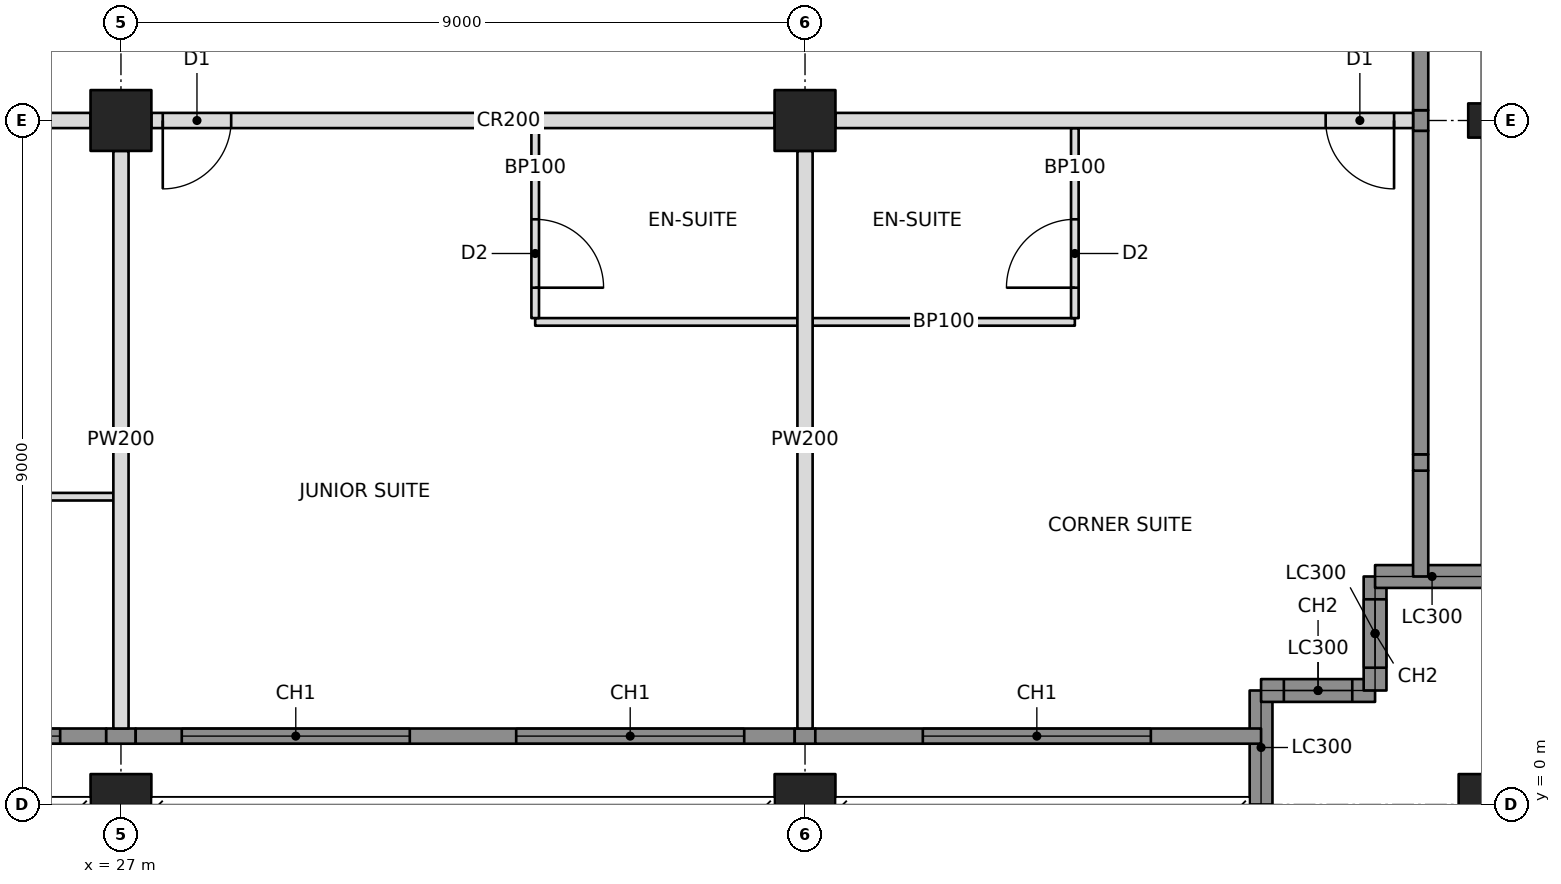
"""IFC4 building model, lengths in metres.
Left out: names, types, materials, properties, quantities, classifications, styles, units other than length and angle.
Written with IfcOpenShell. Run it as: python <this file> out.ifc"""

import sys

from ifc_helpers import new_model, si_unit, direction, frame, frame_2d, origin, origin_2d, place, context, subcontext, project, spatial, rectangle, hollow_rectangle, i_section, extrude, element, fill, save


model = new_model("IFC4")
c1 = context("Model", 3, precision=1e-05, world=origin(), true_north=direction((0.0, 1.0)))
c2 = subcontext(c1, "Body", "Model", "MODEL_VIEW")
j1 = project(units=[si_unit("LENGTHUNIT", "METRE"), si_unit("PLANEANGLEUNIT", "RADIAN")], contexts=[c1])
p1 = place(None, origin())
s1 = spatial("IfcSite", under=j1, at=p1, CompositionType="ELEMENT")
p2 = place(p1, origin())
s2 = spatial("IfcBuilding", under=s1, at=p2, CompositionType="ELEMENT")
p3 = place(p2, frame((0.0, 0.0, 177.4)))
s3 = spatial("IfcBuildingStorey", under=s2, at=p3, CompositionType="ELEMENT", Elevation=177.4)
p4 = place(p3, frame((27.0, 0.0, 0.0), z_axis=(0.0, 0.0, 1.0), x_axis=(1.0, 0.0, 0.0)))
e1 = element("IfcColumn", 1, at=p4, inside=s3, PredefinedType="COLUMN", context=c2, shape_type="SweptSolid", body=[
    extrude(hollow_rectangle(XDim=0.8, YDim=0.8, WallThickness=0.07, at=origin_2d()), origin(), (0.0, 0.0, 1.0), 3.4),
])
p5 = place(p3, frame((27.0, 9.0, 0.0), z_axis=(0.0, 0.0, 1.0), x_axis=(1.0, 0.0, 0.0)))
e2 = element("IfcColumn", 2, at=p5, inside=s3, PredefinedType="COLUMN", context=c2, shape_type="SweptSolid", body=[
    extrude(hollow_rectangle(XDim=0.8, YDim=0.8, WallThickness=0.06, at=origin_2d()), origin(), (0.0, 0.0, 1.0), 3.4),
])
p6 = place(p3, frame((36.0, 0.0, 0.0), z_axis=(0.0, 0.0, 1.0), x_axis=(1.0, 0.0, 0.0)))
e3 = element("IfcColumn", 3, at=p6, inside=s3, PredefinedType="COLUMN", context=c2, shape_type="SweptSolid", body=[
    extrude(hollow_rectangle(XDim=0.8, YDim=0.8, WallThickness=0.07, at=origin_2d()), origin(), (0.0, 0.0, 1.0), 3.4),
])
p7 = place(p3, frame((36.0, 9.0, 0.0), z_axis=(0.0, 0.0, 1.0), x_axis=(0.0, 1.0, 0.0)))
e4 = element("IfcColumn", 4, at=p7, inside=s3, PredefinedType="COLUMN", context=c2, shape_type="SweptSolid", body=[
    extrude(hollow_rectangle(XDim=0.8, YDim=0.8, WallThickness=0.06, at=origin_2d()), origin(), (0.0, 0.0, 1.0), 3.4),
])
p8 = place(p3, frame((45.0, 0.0, 0.0), z_axis=(0.0, 0.0, 1.0), x_axis=(1.0, 0.0, 0.0)))
e5 = element("IfcColumn", 5, at=p8, inside=s3, PredefinedType="COLUMN", context=c2, shape_type="SweptSolid", body=[
    extrude(hollow_rectangle(XDim=0.8, YDim=0.8, WallThickness=0.07, at=origin_2d()), origin(), (0.0, 0.0, 1.0), 3.4),
])
p9 = place(p3, frame((45.0, 9.0, 0.0), z_axis=(0.0, 0.0, 1.0), x_axis=(0.0, 1.0, 0.0)))
e6 = element("IfcColumn", 6, at=p9, inside=s3, PredefinedType="COLUMN", context=c2, shape_type="SweptSolid", body=[
    extrude(i_section(OverallWidth=0.449, OverallDepth=0.549, WebThickness=0.072, FlangeThickness=0.115, at=origin_2d()), origin(), (0.0, 0.0, 1.0), 3.4),
])
p10 = place(p3, frame((42.0, 0.0, 0.0), z_axis=(0.0, 0.0, 1.0), x_axis=(0.0, 1.0, 0.0)))
e7 = element("IfcWall", 7, at=p10, inside=s3, PredefinedType="SOLIDWALL", context=c2, shape_type="SweptSolid", body=[
    extrude(rectangle(XDim=1.5, YDim=0.3, at=frame_2d((0.75, 0.0))), origin(), (0.0, 0.0, 1.0), 2.42),
])
p11 = place(p3, frame((42.0, 1.5, 0.0), z_axis=(0.0, 0.0, 1.0), x_axis=(1.0, 0.0, 0.0)))
e8 = element("IfcWall", 8, at=p11, inside=s3, PredefinedType="SOLIDWALL", context=c2, shape_type="SweptSolid", body=[
    extrude(rectangle(XDim=1.5, YDim=0.3, at=frame_2d((0.75, 0.0))), origin(), (0.0, 0.0, 1.0), 3.2),
])
p12 = place(p11, frame((0.3, 0.0, 0.6)))
e9 = element("IfcOpeningElement", 9, at=p12, cuts=e8, PredefinedType="OPENING", context=c2, shape_type="SweptSolid", body=[
    extrude(rectangle(XDim=0.9, YDim=2.2, at=frame_2d((0.45, 1.1))), frame((0.0, 0.16, 0.0), z_axis=(0.0, -1.0, 0.0), x_axis=(1.0, 0.0, 0.0)), (0.0, 0.0, 1.0), 0.32),
])
p13 = place(p3, frame((43.5, 1.5, 0.0), z_axis=(0.0, 0.0, 1.0), x_axis=(0.0, 1.0, 0.0)))
e10 = element("IfcWall", 10, at=p13, inside=s3, PredefinedType="SOLIDWALL", context=c2, shape_type="SweptSolid", body=[
    extrude(rectangle(XDim=1.5, YDim=0.3, at=frame_2d((0.75, 0.0))), origin(), (0.0, 0.0, 1.0), 3.2),
])
p14 = place(p13, frame((0.3, 0.0, 0.6)))
e11 = element("IfcOpeningElement", 11, at=p14, cuts=e10, PredefinedType="OPENING", context=c2, shape_type="SweptSolid", body=[
    extrude(rectangle(XDim=0.9, YDim=2.2, at=frame_2d((0.45, 1.1))), frame((0.0, 0.16, 0.0), z_axis=(0.0, -1.0, 0.0), x_axis=(1.0, 0.0, 0.0)), (0.0, 0.0, 1.0), 0.32),
])
p15 = place(p3, frame((43.5, 3.0, 0.0), z_axis=(0.0, 0.0, 1.0), x_axis=(1.0, 0.0, 0.0)))
e12 = element("IfcWall", 12, at=p15, inside=s3, PredefinedType="SOLIDWALL", context=c2, shape_type="SweptSolid", body=[
    extrude(rectangle(XDim=1.5, YDim=0.3, at=frame_2d((0.75, 0.0))), origin(), (0.0, 0.0, 1.0), 2.42),
])
p16 = place(p3, frame((44.1, 3.0, 0.0), z_axis=(0.0, 0.0, 1.0), x_axis=(0.0, 1.0, 0.0)))
e13 = element("IfcWall", 13, at=p16, inside=s3, PredefinedType="SOLIDWALL", context=c2, shape_type="SweptSolid", body=[
    extrude(rectangle(XDim=1.393, YDim=0.2, at=frame_2d((0.696, 0.0))), origin(), (0.0, 0.0, 1.0), 3.2),
])
p17 = place(p3, frame((18.4, 9.0, 0.0), z_axis=(0.0, 0.0, 1.0), x_axis=(1.0, 0.0, 0.0)))
e14 = element("IfcWall", 14, at=p17, inside=s3, PredefinedType="PARTITIONING", context=c2, shape_type="SweptSolid", body=[
    extrude(rectangle(XDim=8.2, YDim=0.2, at=frame_2d((4.1, 0.0))), origin(), (0.0, 0.0, 1.0), 2.405),
])
p18 = place(p17, frame((0.15, 0.0, 0.0)))
e15 = element("IfcOpeningElement", 15, at=p18, cuts=e14, PredefinedType="OPENING", context=c2, shape_type="SweptSolid", body=[
    extrude(rectangle(XDim=0.9, YDim=2.1, at=frame_2d((0.45, 1.05))), frame((0.0, 0.11, 0.0), z_axis=(0.0, -1.0, 0.0), x_axis=(1.0, 0.0, 0.0)), (0.0, 0.0, 1.0), 0.22),
])
p19 = place(p3, frame((27.4, 9.0, 0.0), z_axis=(0.0, 0.0, 1.0), x_axis=(1.0, 0.0, 0.0)))
e16 = element("IfcWall", 16, at=p19, inside=s3, PredefinedType="PARTITIONING", context=c2, shape_type="SweptSolid", body=[
    extrude(rectangle(XDim=8.2, YDim=0.2, at=frame_2d((4.1, 0.0))), origin(), (0.0, 0.0, 1.0), 2.405),
])
p20 = place(p19, frame((0.15, 0.0, 0.0)))
e17 = element("IfcOpeningElement", 17, at=p20, cuts=e16, PredefinedType="OPENING", context=c2, shape_type="SweptSolid", body=[
    extrude(rectangle(XDim=0.9, YDim=2.1, at=frame_2d((0.45, 1.05))), frame((0.0, 0.11, 0.0), z_axis=(0.0, -1.0, 0.0), x_axis=(1.0, 0.0, 0.0)), (0.0, 0.0, 1.0), 0.22),
])
p21 = place(p3, frame((36.4, 9.0, 0.0), z_axis=(0.0, 0.0, 1.0), x_axis=(1.0, 0.0, 0.0)))
e18 = element("IfcWall", 18, at=p21, inside=s3, PredefinedType="PARTITIONING", context=c2, shape_type="SweptSolid", body=[
    extrude(rectangle(XDim=7.6, YDim=0.2, at=frame_2d((3.8, 0.0))), origin(), (0.0, 0.0, 1.0), 2.438),
])
p22 = place(p21, frame((6.45, 0.0, 0.0)))
e19 = element("IfcOpeningElement", 19, at=p22, cuts=e18, PredefinedType="OPENING", context=c2, shape_type="SweptSolid", body=[
    extrude(rectangle(XDim=0.9, YDim=2.1, at=frame_2d((0.45, 1.05))), frame((0.0, 0.11, 0.0), z_axis=(0.0, -1.0, 0.0), x_axis=(1.0, 0.0, 0.0)), (0.0, 0.0, 1.0), 0.22),
])
p23 = place(p3, frame((27.0, 8.6, 0.0), z_axis=(0.0, 0.0, 1.0), x_axis=(0.0, -1.0, 0.0)))
e20 = element("IfcWall", 20, at=p23, inside=s3, PredefinedType="PARTITIONING", context=c2, shape_type="SweptSolid", body=[
    extrude(rectangle(XDim=7.6, YDim=0.2, at=frame_2d((3.8, 0.0))), origin(), (0.0, 0.0, 1.0), 2.405),
])
p24 = place(p3, frame((36.0, 8.6, 0.0), z_axis=(0.0, 0.0, 1.0), x_axis=(0.0, -1.0, 0.0)))
e21 = element("IfcWall", 21, at=p24, inside=s3, PredefinedType="PARTITIONING", context=c2, shape_type="SweptSolid", body=[
    extrude(rectangle(XDim=7.6, YDim=0.2, at=frame_2d((3.8, 0.0))), origin(), (0.0, 0.0, 1.0), 2.438),
])
p25 = place(p3, frame((22.5, 4.05, 0.0), z_axis=(0.0, 0.0, 1.0), x_axis=(1.0, 0.0, 0.0)))
e22 = element("IfcWall", 22, at=p25, inside=s3, PredefinedType="PARTITIONING", context=c2, shape_type="SweptSolid", body=[
    extrude(rectangle(XDim=4.4, YDim=0.1, at=frame_2d((2.2, 0.0))), origin(), (0.0, 0.0, 1.0), 2.404),
])
p26 = place(p25, frame((0.5, 0.0, 0.0)))
e23 = element("IfcOpeningElement", 23, at=p26, cuts=e22, PredefinedType="OPENING", context=c2, shape_type="SweptSolid", body=[
    extrude(rectangle(XDim=0.9, YDim=2.1, at=frame_2d((0.45, 1.05))), frame((0.0, 0.06, 0.0), z_axis=(0.0, -1.0, 0.0), x_axis=(1.0, 0.0, 0.0)), (0.0, 0.0, 1.0), 0.12),
])
p27 = place(p3, frame((32.45, 6.35, 0.0), z_axis=(0.0, 0.0, 1.0), x_axis=(1.0, 0.0, 0.0)))
e24 = element("IfcWall", 24, at=p27, inside=s3, PredefinedType="PARTITIONING", context=c2, shape_type="SweptSolid", body=[
    extrude(rectangle(XDim=3.45, YDim=0.1, at=frame_2d((1.725, 0.0))), origin(), (0.0, 0.0, 1.0), 2.438),
])
p28 = place(p3, frame((32.45, 8.9, 0.0), z_axis=(0.0, 0.0, 1.0), x_axis=(0.0, -1.0, 0.0)))
e25 = element("IfcWall", 25, at=p28, inside=s3, PredefinedType="PARTITIONING", context=c2, shape_type="SweptSolid", body=[
    extrude(rectangle(XDim=2.5, YDim=0.1, at=frame_2d((1.25, 0.0))), origin(), (0.0, 0.0, 1.0), 2.404),
])
p29 = place(p28, frame((1.2, 0.0, 0.0)))
e26 = element("IfcOpeningElement", 26, at=p29, cuts=e25, PredefinedType="OPENING", context=c2, shape_type="SweptSolid", body=[
    extrude(rectangle(XDim=0.9, YDim=2.1, at=frame_2d((0.45, 1.05))), frame((0.0, 0.06, 0.0), z_axis=(0.0, -1.0, 0.0), x_axis=(1.0, 0.0, 0.0)), (0.0, 0.0, 1.0), 0.12),
])
p30 = place(p3, frame((36.1, 6.35, 0.0), z_axis=(0.0, 0.0, 1.0), x_axis=(1.0, 0.0, 0.0)))
e27 = element("IfcWall", 27, at=p30, inside=s3, PredefinedType="PARTITIONING", context=c2, shape_type="SweptSolid", body=[
    extrude(rectangle(XDim=3.45, YDim=0.1, at=frame_2d((1.725, 0.0))), origin(), (0.0, 0.0, 1.0), 2.438),
])
p31 = place(p3, frame((39.55, 8.9, 0.0), z_axis=(0.0, 0.0, 1.0), x_axis=(0.0, -1.0, 0.0)))
e28 = element("IfcWall", 28, at=p31, inside=s3, PredefinedType="PARTITIONING", context=c2, shape_type="SweptSolid", body=[
    extrude(rectangle(XDim=2.5, YDim=0.1, at=frame_2d((1.25, 0.0))), origin(), (0.0, 0.0, 1.0), 2.438),
])
p32 = place(p31, frame((1.2, 0.0, 0.0)))
e29 = element("IfcOpeningElement", 29, at=p32, cuts=e28, PredefinedType="OPENING", context=c2, shape_type="SweptSolid", body=[
    extrude(rectangle(XDim=0.9, YDim=2.1, at=frame_2d((0.45, 1.05))), frame((0.0, 0.06, 0.0), z_axis=(0.0, -1.0, 0.0), x_axis=(1.0, 0.0, 0.0)), (0.0, 0.0, 1.0), 0.12),
])
p33 = place(p3, frame((18.194, 0.9, 0.0), z_axis=(0.0, 0.0, 1.0), x_axis=(1.0, 0.0, 0.0)))
e30 = element("IfcWall", 30, at=p33, inside=s3, PredefinedType="SOLIDWALL", context=c2, shape_type="SweptSolid", body=[
    extrude(rectangle(XDim=8.612, YDim=0.2, at=frame_2d((4.306, 0.0))), origin(), (0.0, 0.0, 1.0), 3.2),
])
p34 = place(p33, frame((0.606, 0.0, 0.6)))
e31 = element("IfcOpeningElement", 31, at=p34, cuts=e30, PredefinedType="OPENING", context=c2, shape_type="SweptSolid", body=[
    extrude(rectangle(XDim=3.0, YDim=2.2, at=frame_2d((1.5, 1.1))), frame((0.0, 0.11, 0.0), z_axis=(0.0, -1.0, 0.0), x_axis=(1.0, 0.0, 0.0)), (0.0, 0.0, 1.0), 0.22),
])
p35 = place(p33, frame((5.006, 0.0, 0.6)))
e32 = element("IfcOpeningElement", 32, at=p35, cuts=e30, PredefinedType="OPENING", context=c2, shape_type="SweptSolid", body=[
    extrude(rectangle(XDim=3.0, YDim=2.2, at=frame_2d((1.5, 1.1))), frame((0.0, 0.11, 0.0), z_axis=(0.0, -1.0, 0.0), x_axis=(1.0, 0.0, 0.0)), (0.0, 0.0, 1.0), 0.22),
])
p36 = place(p3, frame((26.806, 0.9, 0.0), z_axis=(0.0, 0.0, 1.0), x_axis=(1.0, 0.0, 0.0)))
e33 = element("IfcWall", 33, at=p36, inside=s3, PredefinedType="SOLIDWALL", context=c2, shape_type="SweptSolid", body=[
    extrude(rectangle(XDim=0.388, YDim=0.2, at=frame_2d((0.194, 0.0))), origin(), (0.0, 0.0, 1.0), 2.404),
])
p37 = place(p3, frame((27.194, 0.9, 0.0), z_axis=(0.0, 0.0, 1.0), x_axis=(1.0, 0.0, 0.0)))
e34 = element("IfcWall", 34, at=p37, inside=s3, PredefinedType="SOLIDWALL", context=c2, shape_type="SweptSolid", body=[
    extrude(rectangle(XDim=8.671, YDim=0.2, at=frame_2d((4.335, 0.0))), origin(), (0.0, 0.0, 1.0), 3.2),
])
p38 = place(p37, frame((0.606, 0.0, 0.6)))
e35 = element("IfcOpeningElement", 35, at=p38, cuts=e34, PredefinedType="OPENING", context=c2, shape_type="SweptSolid", body=[
    extrude(rectangle(XDim=3.0, YDim=2.2, at=frame_2d((1.5, 1.1))), frame((0.0, 0.11, 0.0), z_axis=(0.0, -1.0, 0.0), x_axis=(1.0, 0.0, 0.0)), (0.0, 0.0, 1.0), 0.22),
])
p39 = place(p37, frame((5.006, 0.0, 0.6)))
e36 = element("IfcOpeningElement", 36, at=p39, cuts=e34, PredefinedType="OPENING", context=c2, shape_type="SweptSolid", body=[
    extrude(rectangle(XDim=3.0, YDim=2.2, at=frame_2d((1.5, 1.1))), frame((0.0, 0.11, 0.0), z_axis=(0.0, -1.0, 0.0), x_axis=(1.0, 0.0, 0.0)), (0.0, 0.0, 1.0), 0.22),
])
p40 = place(p3, frame((35.865, 0.9, 0.0), z_axis=(0.0, 0.0, 1.0), x_axis=(1.0, 0.0, 0.0)))
e37 = element("IfcWall", 37, at=p40, inside=s3, PredefinedType="SOLIDWALL", context=c2, shape_type="SweptSolid", body=[
    extrude(rectangle(XDim=0.271, YDim=0.2, at=frame_2d((0.135, 0.0))), origin(), (0.0, 0.0, 1.0), 2.438),
])
p41 = place(p3, frame((36.135, 0.9, 0.0), z_axis=(0.0, 0.0, 1.0), x_axis=(1.0, 0.0, 0.0)))
e38 = element("IfcWall", 38, at=p41, inside=s3, PredefinedType="SOLIDWALL", context=c2, shape_type="SweptSolid", body=[
    extrude(rectangle(XDim=5.865, YDim=0.2, at=frame_2d((2.932, 0.0))), origin(), (0.0, 0.0, 1.0), 3.2),
])
p42 = place(p41, frame((1.415, 0.0, 0.6)))
e39 = element("IfcOpeningElement", 39, at=p42, cuts=e38, PredefinedType="OPENING", context=c2, shape_type="SweptSolid", body=[
    extrude(rectangle(XDim=3.0, YDim=2.2, at=frame_2d((1.5, 1.1))), frame((0.0, 0.11, 0.0), z_axis=(0.0, -1.0, 0.0), x_axis=(1.0, 0.0, 0.0)), (0.0, 0.0, 1.0), 0.22),
])
p43 = place(p3, frame((44.1, 4.393, 0.0), z_axis=(0.0, 0.0, 1.0), x_axis=(0.0, 1.0, 0.0)))
e40 = element("IfcWall", 40, at=p43, inside=s3, PredefinedType="SOLIDWALL", context=c2, shape_type="SweptSolid", body=[
    extrude(rectangle(XDim=0.215, YDim=0.2, at=frame_2d((0.107, 0.0))), origin(), (0.0, 0.0, 1.0), 2.661),
])
p44 = place(p3, frame((44.1, 4.607, 0.0), z_axis=(0.0, 0.0, 1.0), x_axis=(0.0, 1.0, 0.0)))
e41 = element("IfcWall", 41, at=p44, inside=s3, PredefinedType="SOLIDWALL", context=c2, shape_type="SweptSolid", body=[
    extrude(rectangle(XDim=4.257, YDim=0.2, at=frame_2d((2.129, 0.0))), origin(), (0.0, 0.0, 1.0), 3.2),
])
p45 = place(p3, frame((44.1, 8.865, 0.0), z_axis=(0.0, 0.0, 1.0), x_axis=(0.0, 1.0, 0.0)))
e42 = element("IfcWall", 42, at=p45, inside=s3, PredefinedType="SOLIDWALL", context=c2, shape_type="SweptSolid", body=[
    extrude(rectangle(XDim=0.271, YDim=0.2, at=frame_2d((0.135, 0.0))), origin(), (0.0, 0.0, 1.0), 2.438),
])
p46 = place(p3, frame((44.1, 9.135, 0.0), z_axis=(0.0, 0.0, 1.0), x_axis=(0.0, 1.0, 0.0)))
e43 = element("IfcWall", 43, at=p46, inside=s3, PredefinedType="SOLIDWALL", context=c2, shape_type="SweptSolid", body=[
    extrude(rectangle(XDim=8.671, YDim=0.2, at=frame_2d((4.335, 0.0))), origin(), (0.0, 0.0, 1.0), 3.2),
])
p47 = place(p46, frame((2.015, 0.0, 0.6)))
e44 = element("IfcOpeningElement", 44, at=p47, cuts=e43, PredefinedType="OPENING", context=c2, shape_type="SweptSolid", body=[
    extrude(rectangle(XDim=3.0, YDim=2.2, at=frame_2d((1.5, 1.1))), frame((0.0, 0.11, 0.0), z_axis=(0.0, -1.0, 0.0), x_axis=(1.0, 0.0, 0.0)), (0.0, 0.0, 1.0), 0.22),
])
p48 = place(p46, frame((5.515, 0.0, 0.6)))
e45 = element("IfcOpeningElement", 45, at=p48, cuts=e43, PredefinedType="OPENING", context=c2, shape_type="SweptSolid", body=[
    extrude(rectangle(XDim=3.0, YDim=2.2, at=frame_2d((1.5, 1.1))), frame((0.0, 0.11, 0.0), z_axis=(0.0, -1.0, 0.0), x_axis=(1.0, 0.0, 0.0)), (0.0, 0.0, 1.0), 0.22),
])
p49 = place(p12, origin())
e46 = element("IfcWindow", 46, at=p49, inside=s3, PartitioningType="SINGLE_PANEL", PredefinedType="WINDOW", context=c2, shape_type="SweptSolid", body=[
    extrude(rectangle(XDim=0.9, YDim=2.2, at=frame_2d((0.45, 1.1))), frame((0.0, 0.03, 0.0), z_axis=(0.0, -1.0, 0.0), x_axis=(1.0, 0.0, 0.0)), (0.0, 0.0, 1.0), 0.06),
])
fill(e9, e46)
p50 = place(p14, origin())
e47 = element("IfcWindow", 47, at=p50, inside=s3, PartitioningType="SINGLE_PANEL", PredefinedType="WINDOW", context=c2, shape_type="SweptSolid", body=[
    extrude(rectangle(XDim=0.9, YDim=2.2, at=frame_2d((0.45, 1.1))), frame((0.0, 0.03, 0.0), z_axis=(0.0, -1.0, 0.0), x_axis=(1.0, 0.0, 0.0)), (0.0, 0.0, 1.0), 0.06),
])
fill(e11, e47)
p51 = place(p35, origin())
e48 = element("IfcWindow", 48, at=p51, inside=s3, PartitioningType="TRIPLE_PANEL_VERTICAL", PredefinedType="WINDOW", context=c2, shape_type="SweptSolid", body=[
    extrude(rectangle(XDim=3.0, YDim=2.2, at=frame_2d((1.5, 1.1))), frame((0.0, 0.03, 0.0), z_axis=(0.0, -1.0, 0.0), x_axis=(1.0, 0.0, 0.0)), (0.0, 0.0, 1.0), 0.06),
])
fill(e32, e48)
p52 = place(p38, origin())
e49 = element("IfcWindow", 49, at=p52, inside=s3, PartitioningType="TRIPLE_PANEL_VERTICAL", PredefinedType="WINDOW", context=c2, shape_type="SweptSolid", body=[
    extrude(rectangle(XDim=3.0, YDim=2.2, at=frame_2d((1.5, 1.1))), frame((0.0, 0.03, 0.0), z_axis=(0.0, -1.0, 0.0), x_axis=(1.0, 0.0, 0.0)), (0.0, 0.0, 1.0), 0.06),
])
fill(e35, e49)
p53 = place(p39, origin())
e50 = element("IfcWindow", 50, at=p53, inside=s3, PartitioningType="TRIPLE_PANEL_VERTICAL", PredefinedType="WINDOW", context=c2, shape_type="SweptSolid", body=[
    extrude(rectangle(XDim=3.0, YDim=2.2, at=frame_2d((1.5, 1.1))), frame((0.0, 0.03, 0.0), z_axis=(0.0, -1.0, 0.0), x_axis=(1.0, 0.0, 0.0)), (0.0, 0.0, 1.0), 0.06),
])
fill(e36, e50)
p54 = place(p42, origin())
e51 = element("IfcWindow", 51, at=p54, inside=s3, PartitioningType="TRIPLE_PANEL_VERTICAL", PredefinedType="WINDOW", context=c2, shape_type="SweptSolid", body=[
    extrude(rectangle(XDim=3.0, YDim=2.2, at=frame_2d((1.5, 1.1))), frame((0.0, 0.03, 0.0), z_axis=(0.0, -1.0, 0.0), x_axis=(1.0, 0.0, 0.0)), (0.0, 0.0, 1.0), 0.06),
])
fill(e39, e51)
p55 = place(p29, origin())
e52 = element("IfcDoor", 52, at=p55, inside=s3, OperationType="SINGLE_SWING_RIGHT", PredefinedType="DOOR", context=c2, shape_type="SweptSolid", body=[
    extrude(rectangle(XDim=0.9, YDim=2.1, at=frame_2d((0.45, 1.05))), frame((0.0, 0.025, 0.0), z_axis=(0.0, -1.0, 0.0), x_axis=(1.0, 0.0, 0.0)), (0.0, 0.0, 1.0), 0.05),
])
fill(e26, e52)
p56 = place(p20, frame((0.9, 0.0, 0.0), z_axis=(0.0, 0.0, 1.0), x_axis=(-1.0, 0.0, 0.0)))
e53 = element("IfcDoor", 53, at=p56, inside=s3, OperationType="SINGLE_SWING_RIGHT", PredefinedType="DOOR", context=c2, shape_type="SweptSolid", body=[
    extrude(rectangle(XDim=0.9, YDim=2.1, at=frame_2d((0.45, 1.05))), frame((0.0, 0.025, 0.0), z_axis=(0.0, -1.0, 0.0), x_axis=(1.0, 0.0, 0.0)), (0.0, 0.0, 1.0), 0.05),
])
fill(e17, e53)
p57 = place(p32, frame((0.9, 0.0, 0.0), z_axis=(0.0, 0.0, 1.0), x_axis=(-1.0, 0.0, 0.0)))
e54 = element("IfcDoor", 54, at=p57, inside=s3, OperationType="SINGLE_SWING_LEFT", PredefinedType="DOOR", context=c2, shape_type="SweptSolid", body=[
    extrude(rectangle(XDim=0.9, YDim=2.1, at=frame_2d((0.45, 1.05))), frame((0.0, 0.025, 0.0), z_axis=(0.0, -1.0, 0.0), x_axis=(1.0, 0.0, 0.0)), (0.0, 0.0, 1.0), 0.05),
])
fill(e29, e54)
p58 = place(p22, frame((0.9, 0.0, 0.0), z_axis=(0.0, 0.0, 1.0), x_axis=(-1.0, 0.0, 0.0)))
e55 = element("IfcDoor", 55, at=p58, inside=s3, OperationType="SINGLE_SWING_LEFT", PredefinedType="DOOR", context=c2, shape_type="SweptSolid", body=[
    extrude(rectangle(XDim=0.9, YDim=2.1, at=frame_2d((0.45, 1.05))), frame((0.0, 0.025, 0.0), z_axis=(0.0, -1.0, 0.0), x_axis=(1.0, 0.0, 0.0)), (0.0, 0.0, 1.0), 0.05),
])
fill(e19, e55)
save(model, sys.argv[1])
